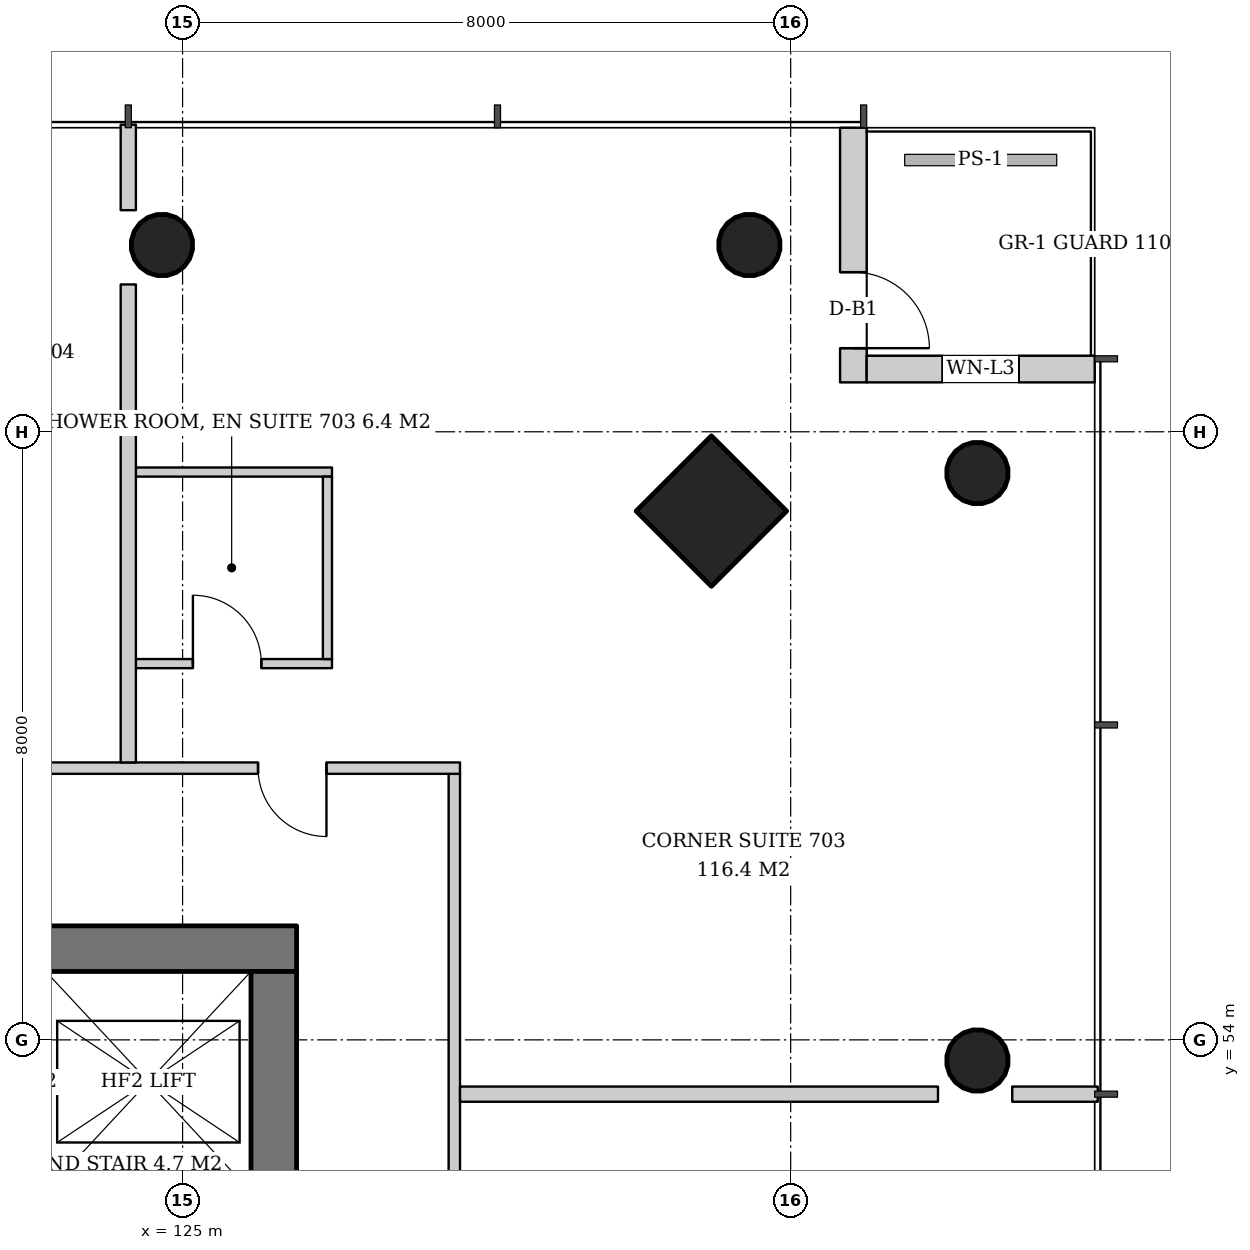
"""IFC4 building model, lengths in metres.
Left out: names, types, materials, properties, quantities, classifications, styles, units other than length and angle.
Written with IfcOpenShell. Run it as: python <this file> out.ifc"""

import sys

from ifc_helpers import new_model, si_unit, direction, frame, frame_2d, origin, origin_2d, place, context, subcontext, project, spatial, rectangle, hollow_circle, extrude, element, fill, save


model = new_model("IFC4")
c1 = context("Model", 3, precision=1e-05, world=origin(), true_north=direction((0.0, 1.0)))
c2 = subcontext(c1, "Body", "Model", "MODEL_VIEW")
j1 = project(units=[si_unit("LENGTHUNIT", "METRE"), si_unit("PLANEANGLEUNIT", "RADIAN")], contexts=[c1])
p1 = place(None, origin())
s1 = spatial("IfcSite", under=j1, at=p1, CompositionType="ELEMENT")
p2 = place(p1, origin())
s2 = spatial("IfcBuilding", under=s1, at=p2, CompositionType="ELEMENT")
p3 = place(p2, frame((0.0, 0.0, 32.4)))
s3 = spatial("IfcBuildingStorey", under=s2, at=p3, CompositionType="ELEMENT", Elevation=32.4)
p4 = place(p3, frame((132.009, 61.009, 0.0), z_axis=(-0.043029647111, -0.043029647111, 0.998146732169), x_axis=(0.707106781187, -0.707106781187, 0.0)))
e1 = element("IfcColumn", 1, at=p4, inside=s3, PredefinedType="COLUMN", context=c2, shape_type="SweptSolid", body=[
    extrude(rectangle(XDim=1.4, YDim=1.4, at=origin_2d()), origin(), (0.0, 0.0, 1.0), 3.807),
])
p5 = place(p3, frame((135.509, 61.509, 0.0), z_axis=(-0.043029647111, -0.043029647111, 0.998146732169), x_axis=(0.707106781187, -0.707106781187, 0.0)))
e2 = element("IfcColumn", 2, at=p5, inside=s3, PredefinedType="COLUMN", context=c2, shape_type="SweptSolid", body=[
    extrude(hollow_circle(Radius=0.406, WallThickness=0.03, at=origin_2d()), origin(), (0.0, 0.0, 1.0), 3.807),
])
p6 = place(p3, frame((135.509, 53.754, 0.0), z_axis=(-0.043059525333, -0.021561848751, 0.998839808957), x_axis=(0.44774654769, -0.894160516368, 0.0)))
e3 = element("IfcColumn", 3, at=p6, inside=s3, PredefinedType="COLUMN", context=c2, shape_type="SweptSolid", body=[
    extrude(hollow_circle(Radius=0.406, WallThickness=0.03, at=origin_2d()), origin(), (0.0, 0.0, 1.0), 3.804),
])
p7 = place(p3, frame((132.509, 64.509, 0.0), z_axis=(-0.043029647111, -0.043029647111, 0.998146732169), x_axis=(0.707106781187, -0.707106781187, 0.0)))
e4 = element("IfcColumn", 4, at=p7, inside=s3, PredefinedType="COLUMN", context=c2, shape_type="SweptSolid", body=[
    extrude(hollow_circle(Radius=0.406, WallThickness=0.03, at=origin_2d()), origin(), (0.0, 0.0, 1.0), 3.807),
])
p8 = place(p3, frame((124.754, 64.509, 0.0), z_axis=(-0.021561848751, -0.043059525333, 0.998839808957), x_axis=(0.894160516368, -0.44774654769, 0.0)))
e5 = element("IfcColumn", 5, at=p8, inside=s3, PredefinedType="COLUMN", context=c2, shape_type="SweptSolid", body=[
    extrude(hollow_circle(Radius=0.406, WallThickness=0.03, at=origin_2d()), origin(), (0.0, 0.0, 1.0), 3.804),
])
p9 = place(p3, frame((107.5, 55.2, 0.0), z_axis=(0.0, 0.0, 1.0), x_axis=(1.0, 0.0, 0.0)))
e6 = element("IfcWall", 6, at=p9, inside=s3, PredefinedType="SHEAR", context=c2, shape_type="SweptSolid", body=[
    extrude(rectangle(XDim=19.0, YDim=0.6, at=frame_2d((9.5, 0.0))), origin(), (0.0, 0.0, 1.0), 3.8),
])
p10 = place(p9, frame((14.14, 0.0, 0.0)))
e7 = element("IfcOpeningElement", 7, at=p10, cuts=e6, PredefinedType="OPENING", context=c2, shape_type="SweptSolid", body=[
    extrude(rectangle(XDim=1.0, YDim=2.1, at=frame_2d((0.5, 1.05))), frame((0.0, 0.31, 0.0), z_axis=(0.0, -1.0, 0.0), x_axis=(1.0, 0.0, 0.0)), (0.0, 0.0, 1.0), 0.62),
])
p11 = place(p9, frame((1.675, 0.0, 0.0)))
e8 = element("IfcOpeningElement", 8, at=p11, cuts=e6, PredefinedType="OPENING", context=c2, shape_type="SweptSolid", body=[
    extrude(rectangle(XDim=1.0, YDim=2.1, at=frame_2d((0.5, 1.05))), frame((0.0, 0.31, 0.0), z_axis=(0.0, -1.0, 0.0), x_axis=(1.0, 0.0, 0.0)), (0.0, 0.0, 1.0), 0.62),
])
p12 = place(p9, frame((3.587, 0.0, 0.0)))
e9 = element("IfcOpeningElement", 9, at=p12, cuts=e6, PredefinedType="OPENING", context=c2, shape_type="SweptSolid", body=[
    extrude(rectangle(XDim=1.0, YDim=2.1, at=frame_2d((0.5, 1.05))), frame((0.0, 0.31, 0.0), z_axis=(0.0, -1.0, 0.0), x_axis=(1.0, 0.0, 0.0)), (0.0, 0.0, 1.0), 0.62),
])
p13 = place(p3, frame((126.2, 37.1, 0.0), z_axis=(0.0, 0.0, 1.0), x_axis=(0.0, 1.0, 0.0)))
e10 = element("IfcWall", 10, at=p13, inside=s3, PredefinedType="SHEAR", context=c2, shape_type="SweptSolid", body=[
    extrude(rectangle(XDim=17.8, YDim=0.6, at=frame_2d((8.9, 0.0))), origin(), (0.0, 0.0, 1.0), 3.8),
])
p14 = place(p13, frame((8.0, 0.0, 0.0)))
e11 = element("IfcOpeningElement", 11, at=p14, cuts=e10, PredefinedType="OPENING", context=c2, shape_type="SweptSolid", body=[
    extrude(rectangle(XDim=1.8, YDim=2.4, at=frame_2d((0.9, 1.2))), frame((0.0, 0.31, 0.0), z_axis=(0.0, -1.0, 0.0), x_axis=(1.0, 0.0, 0.0)), (0.0, 0.0, 1.0), 0.62),
])
p15 = place(p3, frame((133.825, 66.0, 0.0), z_axis=(0.0, 0.0, 1.0), x_axis=(0.0, -1.0, 0.0)))
e12 = element("IfcWall", 12, at=p15, inside=s3, PredefinedType="SOLIDWALL", context=c2, shape_type="SweptSolid", body=[
    extrude(rectangle(XDim=3.35, YDim=0.35, at=frame_2d((1.675, 0.0))), origin(), (0.0, 0.0, 1.0), 3.6),
])
p16 = place(p15, frame((1.9, 0.0, 0.0)))
e13 = element("IfcOpeningElement", 13, at=p16, cuts=e12, PredefinedType="OPENING", context=c2, shape_type="SweptSolid", body=[
    extrude(rectangle(XDim=1.0, YDim=2.4, at=frame_2d((0.5, 1.2))), frame((0.0, 0.185, 0.0), z_axis=(0.0, -1.0, 0.0), x_axis=(1.0, 0.0, 0.0)), (0.0, 0.0, 1.0), 0.37),
])
p17 = place(p3, frame((134.0, 62.825, 0.0), z_axis=(0.0, 0.0, 1.0), x_axis=(1.0, 0.0, 0.0)))
e14 = element("IfcWall", 14, at=p17, inside=s3, PredefinedType="SOLIDWALL", context=c2, shape_type="SweptSolid", body=[
    extrude(rectangle(XDim=3.0, YDim=0.35, at=frame_2d((1.5, 0.0))), origin(), (0.0, 0.0, 1.0), 3.6),
])
p18 = place(p17, frame((1.0, 0.0, 0.9)))
e15 = element("IfcOpeningElement", 15, at=p18, cuts=e14, PredefinedType="OPENING", context=c2, shape_type="SweptSolid", body=[
    extrude(rectangle(XDim=1.0, YDim=2.4, at=frame_2d((0.5, 1.2))), frame((0.0, 0.185, 0.0), z_axis=(0.0, -1.0, 0.0), x_axis=(1.0, 0.0, 0.0)), (0.0, 0.0, 1.0), 0.37),
])
p19 = place(p3, frame((128.575, 34.35, 0.0), z_axis=(0.0, 0.0, 1.0), x_axis=(0.0, 1.0, 0.0)))
e16 = element("IfcWall", 16, at=p19, inside=s3, PredefinedType="PARTITIONING", context=c2, shape_type="SweptSolid", body=[
    extrude(rectangle(XDim=23.15, YDim=0.15, at=frame_2d((11.575, 0.0))), origin(), (0.0, 0.0, 1.0), 2.8),
])
p20 = place(p19, frame((1.757, 0.0, 0.0)))
e17 = element("IfcOpeningElement", 17, at=p20, cuts=e16, PredefinedType="OPENING", context=c2, shape_type="SweptSolid", body=[
    extrude(rectangle(XDim=0.9, YDim=2.1, at=frame_2d((0.45, 1.05))), frame((0.0, 0.085, 0.0), z_axis=(0.0, -1.0, 0.0), x_axis=(1.0, 0.0, 0.0)), (0.0, 0.0, 1.0), 0.17),
])
p21 = place(p19, frame((11.971, 0.0, 0.0)))
e18 = element("IfcOpeningElement", 18, at=p21, cuts=e16, PredefinedType="OPENING", context=c2, shape_type="SweptSolid", body=[
    extrude(rectangle(XDim=0.9, YDim=2.1, at=frame_2d((0.45, 1.05))), frame((0.0, 0.085, 0.0), z_axis=(0.0, -1.0, 0.0), x_axis=(1.0, 0.0, 0.0)), (0.0, 0.0, 1.0), 0.17),
])
p22 = place(p3, frame((128.65, 53.286, 0.0), z_axis=(0.0, 0.0, 1.0), x_axis=(1.0, 0.0, 0.0)))
e19 = element("IfcWall", 19, at=p22, inside=s3, PredefinedType="PARTITIONING", context=c2, shape_type="SweptSolid", body=[
    extrude(rectangle(XDim=6.288, YDim=0.2, at=frame_2d((3.144, 0.0))), origin(), (0.0, 0.0, 1.0), 3.6),
])
p23 = place(p3, frame((135.915, 53.286, 0.0), z_axis=(0.0, 0.0, 1.0), x_axis=(1.0, 0.0, 0.0)))
e20 = element("IfcWall", 20, at=p23, inside=s3, PredefinedType="PARTITIONING", context=c2, shape_type="SweptSolid", body=[
    extrude(rectangle(XDim=1.125, YDim=0.2, at=frame_2d((0.562, 0.0))), origin(), (0.0, 0.0, 1.0), 3.6),
])
p24 = place(p3, frame((124.386, 58.95, 0.0), z_axis=(0.0, 0.0, 1.0), x_axis=(1.0, 0.0, 0.0)))
e21 = element("IfcWall", 21, at=p24, inside=s3, PredefinedType="PARTITIONING", context=c2, shape_type="SweptSolid", body=[
    extrude(rectangle(XDim=2.58, YDim=0.12, at=frame_2d((1.29, 0.0))), origin(), (0.0, 0.0, 1.0), 2.8),
])
p25 = place(p24, frame((0.75, 0.0, 0.0)))
e22 = element("IfcOpeningElement", 22, at=p25, cuts=e21, PredefinedType="OPENING", context=c2, shape_type="SweptSolid", body=[
    extrude(rectangle(XDim=0.9, YDim=2.1, at=frame_2d((0.45, 1.05))), frame((0.0, 0.07, 0.0), z_axis=(0.0, -1.0, 0.0), x_axis=(1.0, 0.0, 0.0)), (0.0, 0.0, 1.0), 0.14),
])
p26 = place(p3, frame((124.386, 61.47, 0.0), z_axis=(0.0, 0.0, 1.0), x_axis=(1.0, 0.0, 0.0)))
e23 = element("IfcWall", 23, at=p26, inside=s3, PredefinedType="PARTITIONING", context=c2, shape_type="SweptSolid", body=[
    extrude(rectangle(XDim=2.58, YDim=0.12, at=frame_2d((1.29, 0.0))), origin(), (0.0, 0.0, 1.0), 2.8),
])
p27 = place(p3, frame((126.906, 59.01, 0.0), z_axis=(0.0, 0.0, 1.0), x_axis=(0.0, 1.0, 0.0)))
e24 = element("IfcWall", 24, at=p27, inside=s3, PredefinedType="PARTITIONING", context=c2, shape_type="SweptSolid", body=[
    extrude(rectangle(XDim=2.4, YDim=0.12, at=frame_2d((1.2, 0.0))), origin(), (0.0, 0.0, 1.0), 2.847),
])
p28 = place(p3, frame((128.65, 57.575, 0.0), z_axis=(0.0, 0.0, 1.0), x_axis=(-1.0, 0.0, 0.0)))
e25 = element("IfcWall", 25, at=p28, inside=s3, PredefinedType="PARTITIONING", context=c2, shape_type="SweptSolid", body=[
    extrude(rectangle(XDim=23.15, YDim=0.15, at=frame_2d((11.575, 0.0))), origin(), (0.0, 0.0, 1.0), 2.8),
])
p29 = place(p28, frame((1.757, 0.0, 0.0)))
e26 = element("IfcOpeningElement", 26, at=p29, cuts=e25, PredefinedType="OPENING", context=c2, shape_type="SweptSolid", body=[
    extrude(rectangle(XDim=0.9, YDim=2.1, at=frame_2d((0.45, 1.05))), frame((0.0, 0.085, 0.0), z_axis=(0.0, -1.0, 0.0), x_axis=(1.0, 0.0, 0.0)), (0.0, 0.0, 1.0), 0.17),
])
p30 = place(p28, frame((5.572, 0.0, 0.0)))
e27 = element("IfcOpeningElement", 27, at=p30, cuts=e25, PredefinedType="OPENING", context=c2, shape_type="SweptSolid", body=[
    extrude(rectangle(XDim=0.9, YDim=2.1, at=frame_2d((0.45, 1.05))), frame((0.0, 0.085, 0.0), z_axis=(0.0, -1.0, 0.0), x_axis=(1.0, 0.0, 0.0)), (0.0, 0.0, 1.0), 0.17),
])
p31 = place(p28, frame((11.971, 0.0, 0.0)))
e28 = element("IfcOpeningElement", 28, at=p31, cuts=e25, PredefinedType="OPENING", context=c2, shape_type="SweptSolid", body=[
    extrude(rectangle(XDim=0.9, YDim=2.1, at=frame_2d((0.45, 1.05))), frame((0.0, 0.085, 0.0), z_axis=(0.0, -1.0, 0.0), x_axis=(1.0, 0.0, 0.0)), (0.0, 0.0, 1.0), 0.17),
])
p32 = place(p28, frame((15.286, 0.0, 0.0)))
e29 = element("IfcOpeningElement", 29, at=p32, cuts=e25, PredefinedType="OPENING", context=c2, shape_type="SweptSolid", body=[
    extrude(rectangle(XDim=0.9, YDim=2.1, at=frame_2d((0.45, 1.05))), frame((0.0, 0.085, 0.0), z_axis=(0.0, -1.0, 0.0), x_axis=(1.0, 0.0, 0.0)), (0.0, 0.0, 1.0), 0.17),
])
p33 = place(p3, frame((124.286, 57.65, 0.0), z_axis=(0.0, 0.0, 1.0), x_axis=(0.0, 1.0, 0.0)))
e30 = element("IfcWall", 30, at=p33, inside=s3, PredefinedType="PARTITIONING", context=c2, shape_type="SweptSolid", body=[
    extrude(rectangle(XDim=6.288, YDim=0.2, at=frame_2d((3.144, 0.0))), origin(), (0.0, 0.0, 1.0), 3.6),
])
p34 = place(p3, frame((124.286, 64.915, 0.0), z_axis=(0.0, 0.0, 1.0), x_axis=(0.0, 1.0, 0.0)))
e31 = element("IfcWall", 31, at=p34, inside=s3, PredefinedType="PARTITIONING", context=c2, shape_type="SweptSolid", body=[
    extrude(rectangle(XDim=1.125, YDim=0.2, at=frame_2d((0.562, 0.0))), origin(), (0.0, 0.0, 1.0), 3.6),
])
p35 = place(p16, origin())
e32 = element("IfcDoor", 32, at=p35, inside=s3, OperationType="SINGLE_SWING_RIGHT", PredefinedType="DOOR", context=c2, shape_type="SweptSolid", body=[
    extrude(rectangle(XDim=1.0, YDim=2.4, at=frame_2d((0.5, 1.2))), frame((0.0, 0.025, 0.0), z_axis=(0.0, -1.0, 0.0), x_axis=(1.0, 0.0, 0.0)), (0.0, 0.0, 1.0), 0.05),
])
fill(e13, e32)
p36 = place(p18, origin())
e33 = element("IfcWindow", 33, at=p36, inside=s3, PartitioningType="SINGLE_PANEL", PredefinedType="WINDOW", context=c2, shape_type="SweptSolid", body=[
    extrude(rectangle(XDim=1.0, YDim=2.4, at=frame_2d((0.5, 1.2))), frame((0.0, 0.03, 0.0), z_axis=(0.0, -1.0, 0.0), x_axis=(1.0, 0.0, 0.0)), (0.0, 0.0, 1.0), 0.06),
])
fill(e15, e33)
p37 = place(p25, origin())
e34 = element("IfcDoor", 34, at=p37, inside=s3, OperationType="SINGLE_SWING_LEFT", PredefinedType="DOOR", context=c2, shape_type="SweptSolid", body=[
    extrude(rectangle(XDim=0.9, YDim=2.1, at=frame_2d((0.45, 1.05))), frame((0.0, 0.025, 0.0), z_axis=(0.0, -1.0, 0.0), x_axis=(1.0, 0.0, 0.0)), (0.0, 0.0, 1.0), 0.05),
])
fill(e22, e34)
p38 = place(p29, origin())
e35 = element("IfcDoor", 35, at=p38, inside=s3, OperationType="SINGLE_SWING_LEFT", PredefinedType="DOOR", context=c2, shape_type="SweptSolid", body=[
    extrude(rectangle(XDim=0.9, YDim=2.1, at=frame_2d((0.45, 1.05))), frame((0.0, 0.025, 0.0), z_axis=(0.0, -1.0, 0.0), x_axis=(1.0, 0.0, 0.0)), (0.0, 0.0, 1.0), 0.05),
])
fill(e26, e35)
save(model, sys.argv[1])
